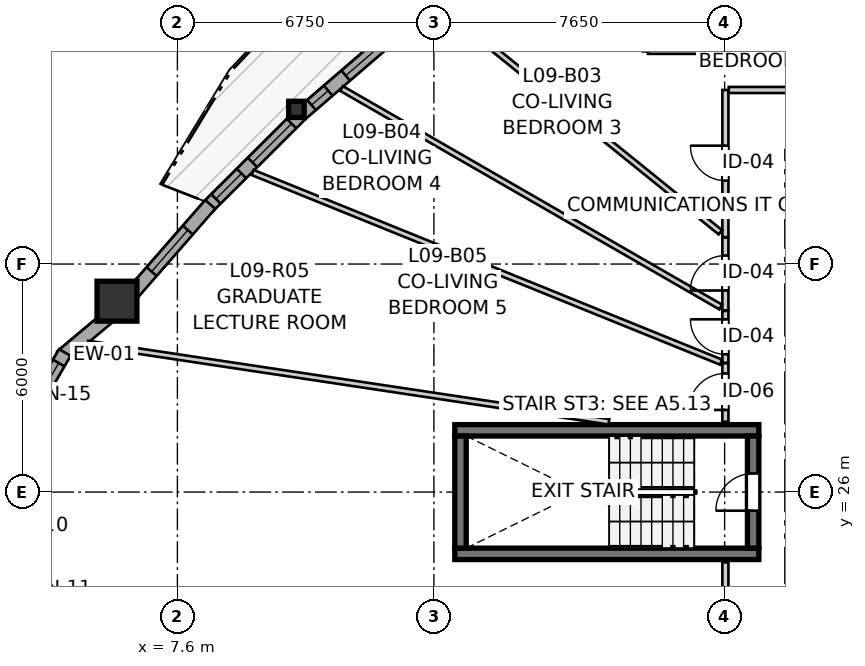
"""IFC4 building model, lengths in metres.
Left out: names, types, materials, properties, quantities, classifications, styles, units other than length and angle.
Written with IfcOpenShell. Run it as: python <this file> out.ifc"""

import sys

from ifc_helpers import new_model, si_unit, direction, frame, frame_2d, origin, origin_2d, place, context, subcontext, project, spatial, rectangle, i_section, extrude, source, transform, mapped, element, fill, save


model = new_model("IFC4")
c1 = context("Model", 3, precision=1e-05, world=origin(), true_north=direction((0.0, 1.0)))
c2 = subcontext(c1, "Body", "Model", "MODEL_VIEW")
j1 = project(units=[si_unit("LENGTHUNIT", "METRE"), si_unit("PLANEANGLEUNIT", "RADIAN")], contexts=[c1])
p1 = place(None, origin())
s1 = spatial("IfcSite", under=j1, at=p1, CompositionType="ELEMENT")
p2 = place(p1, origin())
s2 = spatial("IfcBuilding", under=s1, at=p2, CompositionType="ELEMENT")
p3 = place(p2, frame((0.0, 0.0, 33.4)))
s3 = spatial("IfcBuildingStorey", under=s2, at=p3, CompositionType="ELEMENT", Elevation=33.4)
for number, where, z_axis, x_axis in (
    (1, (14.9, 24.375, 0.0), (0.0, 0.0, 1.0), (1.0, 0.0, 0.0)),
    (2, (22.9, 27.625, 0.0), (0.0, 0.0, 1.0), (-1.0, 0.0, 0.0)),
):
    element("IfcWall", number, at=place(p3, frame(where, z_axis=z_axis, x_axis=x_axis)), inside=s3, PredefinedType="SHEAR", context=c2, shape_type="SweptSolid", body=[
        extrude(rectangle(XDim=8.0, YDim=0.3, at=frame_2d((4.0, 0.0))), origin(), (0.0, 0.0, 1.0), 2.94),
    ])
p4 = place(p3, frame((15.05, 27.475, 0.0), z_axis=(0.0, 0.0, 1.0), x_axis=(0.0, -1.0, 0.0)))
e3 = element("IfcWall", 3, at=p4, inside=s3, PredefinedType="SHEAR", context=c2, shape_type="SweptSolid", body=[
    extrude(rectangle(XDim=2.95, YDim=0.3, at=frame_2d((1.475, 0.0))), origin(), (0.0, 0.0, 1.0), 2.94),
])
p5 = place(p3, frame((22.75, 24.525, 0.0), z_axis=(0.0, 0.0, 1.0), x_axis=(0.0, 1.0, 0.0)))
e4 = element("IfcWall", 4, at=p5, inside=s3, PredefinedType="SHEAR", context=c2, shape_type="SweptSolid", body=[
    extrude(rectangle(XDim=2.95, YDim=0.3, at=frame_2d((1.475, 0.0))), origin(), (0.0, 0.0, 1.0), 2.94),
])
p6 = place(p5, frame((0.985, 0.0, 0.0)))
e5 = element("IfcOpeningElement", 5, at=p6, cuts=e4, PredefinedType="OPENING", context=c2, shape_type="SweptSolid", body=[
    extrude(rectangle(XDim=0.98, YDim=2.15, at=frame_2d((0.49, 1.075))), frame((0.0, 0.16, 0.0), z_axis=(0.0, -1.0, 0.0), x_axis=(1.0, 0.0, 0.0)), (0.0, 0.0, 1.0), 0.32),
])
m1 = source(origin(), c2, "Body", "SweptSolid", [
    extrude(rectangle(XDim=1.05, YDim=1.05, at=origin_2d()), origin(), (0.0, 0.0, 1.0), 2.94),
])
p7 = place(p3, frame((6.01, 31.023, 0.0), z_axis=(0.0, 0.0, 1.0), x_axis=(1.0, 0.0, 0.0)))
e6 = element("IfcColumn", 6, at=p7, inside=s3, PredefinedType="COLUMN", context=c2, shape_type="MappedRepresentation", body=[
    mapped(m1, transform((0.0, 0.0, 0.0), x_axis=(1.0, 0.0, 0.0), y_axis=(0.0, 1.0, 0.0), z_axis=(0.0, 0.0, 1.0), scale=1.0)),
])
m2 = source(origin(), c2, "Body", "SweptSolid", [
    extrude(i_section(OverallWidth=0.409, OverallDepth=0.425, WebThickness=0.03, FlangeThickness=0.048, FilletRadius=0.015, at=origin_2d()), origin(), (0.0, 0.0, 1.0), 2.94),
])
p8 = place(p3, frame((10.732, 36.07, 0.0), z_axis=(0.0, 0.0, 1.0), x_axis=(1.0, 0.0, 0.0)))
e7 = element("IfcColumn", 7, at=p8, inside=s3, PredefinedType="PILASTER", context=c2, shape_type="MappedRepresentation", body=[
    mapped(m2, transform((0.0, 0.0, 0.0), x_axis=(1.0, 0.0, 0.0), y_axis=(0.0, 1.0, 0.0), z_axis=(0.0, 0.0, 1.0), scale=1.0)),
])
p9 = place(p3, frame((5.893, 30.696, 0.0), z_axis=(0.0, 0.0, 1.0), x_axis=(-0.766001205563, -0.64283913468, 0.0)))
e8 = element("IfcWall", 8, at=p9, inside=s3, PredefinedType="SOLIDWALL", context=c2, shape_type="SweptSolid", body=[
    extrude(rectangle(XDim=1.752, YDim=0.35, at=frame_2d((0.876, 0.0))), origin(), (0.0, 0.0, 1.0), 2.42),
])
p10 = place(p3, frame((4.637, 29.674, 0.0), z_axis=(0.0, 0.0, 1.0), x_axis=(-0.499995423472, -0.866028046028, 0.0)))
e9 = element("IfcWall", 9, at=p10, inside=s3, PredefinedType="SOLIDWALL", context=c2, shape_type="SweptSolid", body=[
    extrude(rectangle(XDim=2.09, YDim=0.35, at=frame_2d((1.045, 0.0))), origin(), (0.0, 0.0, 1.0), 2.42),
])
p11 = place(p10, frame((0.32, 0.0, 0.82)))
e10 = element("IfcOpeningElement", 10, at=p11, cuts=e9, PredefinedType="OPENING", context=c2, shape_type="SweptSolid", body=[
    extrude(rectangle(XDim=1.45, YDim=1.25, at=frame_2d((0.725, 0.625))), frame((0.0, 0.185, 0.0), z_axis=(0.0, -1.0, 0.0), x_axis=(1.0, 0.0, 0.0)), (0.0, 0.0, 1.0), 0.37),
])
p12 = place(p3, frame((3.592, 24.137, 0.0), z_axis=(0.0, 0.0, 1.0), x_axis=(0.499995423472, -0.866028046028, 0.0)))
e11 = element("IfcWall", 11, at=p12, inside=s3, PredefinedType="SOLIDWALL", context=c2, shape_type="SweptSolid", body=[
    extrude(rectangle(XDim=2.09, YDim=0.35, at=frame_2d((1.045, 0.0))), origin(), (0.0, 0.0, 1.0), 2.42),
])
p13 = place(p12, frame((0.42, 0.0, 0.82)))
e12 = element("IfcOpeningElement", 12, at=p13, cuts=e11, PredefinedType="OPENING", context=c2, shape_type="SweptSolid", body=[
    extrude(rectangle(XDim=1.25, YDim=1.35, at=frame_2d((0.625, 0.675))), frame((0.0, 0.185, 0.0), z_axis=(0.0, -1.0, 0.0), x_axis=(1.0, 0.0, 0.0)), (0.0, 0.0, 1.0), 0.37),
])
p14 = place(p3, frame((13.424, 38.16, 0.0), z_axis=(0.0, 0.0, 1.0), x_axis=(-0.757512075852, -0.652821150805, 0.0)))
e13 = element("IfcWall", 13, at=p14, inside=s3, PredefinedType="SOLIDWALL", context=c2, shape_type="SweptSolid", body=[
    extrude(rectangle(XDim=3.384, YDim=0.35, at=frame_2d((1.692, 0.0))), origin(), (0.0, 0.0, 1.0), 2.42),
])
p15 = place(p14, frame((0.392, 0.0, 0.82)))
e14 = element("IfcOpeningElement", 14, at=p15, cuts=e13, PredefinedType="OPENING", context=c2, shape_type="SweptSolid", body=[
    extrude(rectangle(XDim=1.45, YDim=1.25, at=frame_2d((0.725, 0.625))), frame((0.0, 0.185, 0.0), z_axis=(0.0, -1.0, 0.0), x_axis=(1.0, 0.0, 0.0)), (0.0, 0.0, 1.0), 0.37),
])
p16 = place(p14, frame((2.449, 0.0, 0.82)))
e15 = element("IfcOpeningElement", 15, at=p16, cuts=e13, PredefinedType="OPENING", context=c2, shape_type="SweptSolid", body=[
    extrude(rectangle(XDim=0.58, YDim=1.35, at=frame_2d((0.29, 0.675))), frame((0.0, 0.185, 0.0), z_axis=(0.0, -1.0, 0.0), x_axis=(1.0, 0.0, 0.0)), (0.0, 0.0, 1.0), 0.37),
])
p17 = place(p3, frame((10.841, 35.932, 0.0), z_axis=(0.0, 0.0, 1.0), x_axis=(-0.708383272101, -0.70582798174, 0.0)))
e16 = element("IfcWall", 16, at=p17, inside=s3, PredefinedType="SOLIDWALL", context=c2, shape_type="SweptSolid", body=[
    extrude(rectangle(XDim=3.439, YDim=0.35, at=frame_2d((1.72, 0.0))), origin(), (0.0, 0.0, 1.0), 2.42),
])
p18 = place(p17, frame((0.334, 0.0, 0.82)))
e17 = element("IfcOpeningElement", 17, at=p18, cuts=e16, PredefinedType="OPENING", context=c2, shape_type="SweptSolid", body=[
    extrude(rectangle(XDim=1.45, YDim=1.25, at=frame_2d((0.725, 0.625))), frame((0.0, 0.185, 0.0), z_axis=(0.0, -1.0, 0.0), x_axis=(1.0, 0.0, 0.0)), (0.0, 0.0, 1.0), 0.37),
])
p19 = place(p17, frame((2.194, 0.0, 0.82)))
e18 = element("IfcOpeningElement", 18, at=p19, cuts=e16, PredefinedType="OPENING", context=c2, shape_type="SweptSolid", body=[
    extrude(rectangle(XDim=0.95, YDim=1.35, at=frame_2d((0.475, 0.675))), frame((0.0, 0.185, 0.0), z_axis=(0.0, -1.0, 0.0), x_axis=(1.0, 0.0, 0.0)), (0.0, 0.0, 1.0), 0.37),
])
p20 = place(p3, frame((8.465, 33.569, 0.0), z_axis=(0.0, 0.0, 1.0), x_axis=(-0.657600500685, -0.753366830634, 0.0)))
e19 = element("IfcWall", 19, at=p20, inside=s3, PredefinedType="SOLIDWALL", context=c2, shape_type="SweptSolid", body=[
    extrude(rectangle(XDim=3.233, YDim=0.35, at=frame_2d((1.616, 0.0))), origin(), (0.0, 0.0, 1.0), 2.42),
])
p21 = place(p20, frame((0.896, 0.0, 0.82)))
e20 = element("IfcOpeningElement", 20, at=p21, cuts=e19, PredefinedType="OPENING", context=c2, shape_type="SweptSolid", body=[
    extrude(rectangle(XDim=1.45, YDim=1.25, at=frame_2d((0.725, 0.625))), frame((0.0, 0.185, 0.0), z_axis=(0.0, -1.0, 0.0), x_axis=(1.0, 0.0, 0.0)), (0.0, 0.0, 1.0), 0.37),
])
p22 = place(p3, frame((22.02, 16.883, 0.0), z_axis=(0.0, 0.0, 1.0), x_axis=(0.0, 1.0, 0.0)))
e21 = element("IfcWall", 21, at=p22, inside=s3, PredefinedType="PARTITIONING", context=c2, shape_type="SweptSolid", body=[
    extrude(rectangle(XDim=7.267, YDim=0.16, at=frame_2d((3.633, 0.0))), origin(), (0.0, 0.0, 1.0), 2.94),
])
p23 = place(p22, frame((2.845, 0.0, 0.0)))
e22 = element("IfcOpeningElement", 22, at=p23, cuts=e21, PredefinedType="OPENING", context=c2, shape_type="SweptSolid", body=[
    extrude(rectangle(XDim=1.3, YDim=2.1, at=frame_2d((0.65, 1.05))), frame((0.0, 0.09, 0.0), z_axis=(0.0, -1.0, 0.0), x_axis=(1.0, 0.0, 0.0)), (0.0, 0.0, 1.0), 0.18),
])
p24 = place(p3, frame((22.02, 32.71, 0.0), z_axis=(0.0, 0.0, 1.0), x_axis=(0.0, 1.0, 0.0)))
e23 = element("IfcWall", 23, at=p24, inside=s3, PredefinedType="PARTITIONING", context=c2, shape_type="SweptSolid", body=[
    extrude(rectangle(XDim=3.87, YDim=0.16, at=frame_2d((1.935, 0.0))), origin(), (0.0, 0.0, 1.0), 2.94),
])
p25 = place(p24, frame((1.485, 0.0, 0.0)))
e24 = element("IfcOpeningElement", 24, at=p25, cuts=e23, PredefinedType="OPENING", context=c2, shape_type="SweptSolid", body=[
    extrude(rectangle(XDim=0.92, YDim=2.1, at=frame_2d((0.46, 1.05))), frame((0.0, 0.09, 0.0), z_axis=(0.0, -1.0, 0.0), x_axis=(1.0, 0.0, 0.0)), (0.0, 0.0, 1.0), 0.18),
])
p26 = place(p3, frame((22.02, 30.782, 0.0), z_axis=(0.0, 0.0, 1.0), x_axis=(0.0, 1.0, 0.0)))
e25 = element("IfcWall", 25, at=p26, inside=s3, PredefinedType="PARTITIONING", context=c2, shape_type="SweptSolid", body=[
    extrude(rectangle(XDim=1.913, YDim=0.16, at=frame_2d((0.957, 0.0))), origin(), (0.0, 0.0, 1.0), 2.94),
])
p27 = place(p26, frame((0.522, 0.0, 0.0)))
e26 = element("IfcOpeningElement", 26, at=p27, cuts=e25, PredefinedType="OPENING", context=c2, shape_type="SweptSolid", body=[
    extrude(rectangle(XDim=0.92, YDim=2.1, at=frame_2d((0.46, 1.05))), frame((0.0, 0.09, 0.0), z_axis=(0.0, -1.0, 0.0), x_axis=(1.0, 0.0, 0.0)), (0.0, 0.0, 1.0), 0.18),
])
p28 = place(p3, frame((22.02, 27.85, 0.0), z_axis=(0.0, 0.0, 1.0), x_axis=(0.0, 1.0, 0.0)))
e27 = element("IfcWall", 27, at=p28, inside=s3, PredefinedType="PARTITIONING", context=c2, shape_type="SweptSolid", body=[
    extrude(rectangle(XDim=1.539, YDim=0.16, at=frame_2d((0.77, 0.0))), origin(), (0.0, 0.0, 1.0), 2.94),
])
p29 = place(p28, frame((0.311, 0.0, 0.0)))
e28 = element("IfcOpeningElement", 28, at=p29, cuts=e27, PredefinedType="OPENING", context=c2, shape_type="SweptSolid", body=[
    extrude(rectangle(XDim=0.96, YDim=2.1, at=frame_2d((0.48, 1.05))), frame((0.0, 0.09, 0.0), z_axis=(0.0, -1.0, 0.0), x_axis=(1.0, 0.0, 0.0)), (0.0, 0.0, 1.0), 0.18),
])
p30 = place(p3, frame((22.02, 29.404, 0.0), z_axis=(0.0, 0.0, 1.0), x_axis=(0.0, 1.0, 0.0)))
e29 = element("IfcWall", 29, at=p30, inside=s3, PredefinedType="PARTITIONING", context=c2, shape_type="SweptSolid", body=[
    extrude(rectangle(XDim=1.363, YDim=0.16, at=frame_2d((0.682, 0.0))), origin(), (0.0, 0.0, 1.0), 2.94),
])
p31 = place(p30, frame((0.222, 0.0, 0.0)))
e30 = element("IfcOpeningElement", 30, at=p31, cuts=e29, PredefinedType="OPENING", context=c2, shape_type="SweptSolid", body=[
    extrude(rectangle(XDim=0.92, YDim=2.1, at=frame_2d((0.46, 1.05))), frame((0.0, 0.09, 0.0), z_axis=(0.0, -1.0, 0.0), x_axis=(1.0, 0.0, 0.0)), (0.0, 0.0, 1.0), 0.18),
])
p32 = place(p3, frame((5.242, 29.91, 0.0), z_axis=(0.0, 0.0, 1.0), x_axis=(0.988899381561, -0.148586719285, 0.0)))
e31 = element("IfcWall", 31, at=p32, inside=s3, PredefinedType="PARTITIONING", context=c2, shape_type="SweptSolid", body=[
    extrude(rectangle(XDim=13.864, YDim=0.145, at=frame_2d((6.932, 0.0))), origin(), (0.0, 0.0, 1.0), 2.94),
])
p33 = place(p3, frame((9.577, 34.41, 0.0), z_axis=(0.0, 0.0, 1.0), x_axis=(0.926920362809, -0.375258099194, 0.0)))
e32 = element("IfcWall", 32, at=p33, inside=s3, PredefinedType="PARTITIONING", context=c2, shape_type="SweptSolid", body=[
    extrude(rectangle(XDim=13.3, YDim=0.145, at=frame_2d((6.65, 0.0))), origin(), (0.0, 0.0, 1.0), 2.94),
])
p34 = place(p3, frame((11.92, 36.618, 0.0), z_axis=(0.0, 0.0, 1.0), x_axis=(0.866473494239, -0.499223080177, 0.0)))
e33 = element("IfcWall", 33, at=p34, inside=s3, PredefinedType="PARTITIONING", context=c2, shape_type="SweptSolid", body=[
    extrude(rectangle(XDim=11.514, YDim=0.145, at=frame_2d((5.757, 0.0))), origin(), (0.0, 0.0, 1.0), 2.94),
])
p35 = place(p3, frame((14.566, 38.751, 0.0), z_axis=(0.0, 0.0, 1.0), x_axis=(0.777881688073, -0.628410756879, 0.0)))
e34 = element("IfcWall", 34, at=p35, inside=s3, PredefinedType="PARTITIONING", context=c2, shape_type="SweptSolid", body=[
    extrude(rectangle(XDim=9.413, YDim=0.145, at=frame_2d((4.707, 0.0))), origin(), (0.0, 0.0, 1.0), 2.94),
])
p36 = place(p3, frame((20.481, 42.51, 0.0), z_axis=(0.0, 0.0, 1.0), x_axis=(0.513067331262, -0.858348363773, 0.0)))
e35 = element("IfcWall", 35, at=p36, inside=s3, PredefinedType="PARTITIONING", context=c2, shape_type="SweptSolid", body=[
    extrude(rectangle(XDim=6.765, YDim=0.145, at=frame_2d((3.382, 0.0))), origin(), (0.0, 0.0, 1.0), 2.94),
])
p37 = place(p3, frame((22.108, 36.58, 0.0), z_axis=(0.0, 0.0, 1.0), x_axis=(1.0, 0.0, 0.0)))
e36 = element("IfcWall", 36, at=p37, inside=s3, PredefinedType="PARTITIONING", context=c2, shape_type="SweptSolid", body=[
    extrude(rectangle(XDim=1.746, YDim=0.16, at=frame_2d((0.873, 0.0))), origin(), (0.0, 0.0, 1.0), 2.548),
])
p38 = place(p3, frame((19.983, 37.595, 0.0), z_axis=(0.0, 0.0, 1.0), x_axis=(1.0, 0.0, 0.0)))
e37 = element("IfcWall", 37, at=p38, inside=s3, PredefinedType="PARTITIONING", context=c2, shape_type="SweptSolid", body=[
    extrude(rectangle(XDim=1.654, YDim=0.13, at=frame_2d((0.827, 0.0))), origin(), (0.0, 0.0, 1.0), 2.94),
])
m3 = source(origin(), c2, "Body", "SweptSolid", [
    extrude(rectangle(XDim=1.45, YDim=1.25, at=frame_2d((0.725, 0.625))), frame((0.0, 0.03, 0.0), z_axis=(0.0, -1.0, 0.0), x_axis=(1.0, 0.0, 0.0)), (0.0, 0.0, 1.0), 0.06),
])
p39 = place(p11, origin())
e38 = element("IfcWindow", 38, at=p39, inside=s3, PartitioningType="SINGLE_PANEL", PredefinedType="WINDOW", context=c2, shape_type="MappedRepresentation", body=[
    mapped(m3, transform((0.0, 0.0, 0.0), x_axis=(1.0, 0.0, 0.0), y_axis=(0.0, 1.0, 0.0), z_axis=(0.0, 0.0, 1.0), scale=1.0)),
])
fill(e10, e38)
m4 = source(origin(), c2, "Body", "SweptSolid", [
    extrude(rectangle(XDim=1.25, YDim=1.35, at=frame_2d((0.625, 0.675))), frame((0.0, 0.03, 0.0), z_axis=(0.0, -1.0, 0.0), x_axis=(1.0, 0.0, 0.0)), (0.0, 0.0, 1.0), 0.06),
])
p40 = place(p13, origin())
e39 = element("IfcWindow", 39, at=p40, inside=s3, PartitioningType="SINGLE_PANEL", PredefinedType="WINDOW", context=c2, shape_type="MappedRepresentation", body=[
    mapped(m4, transform((0.0, 0.0, 0.0), x_axis=(1.0, 0.0, 0.0), y_axis=(0.0, 1.0, 0.0), z_axis=(0.0, 0.0, 1.0), scale=1.0)),
])
fill(e12, e39)
p41 = place(p15, origin())
e40 = element("IfcWindow", 40, at=p41, inside=s3, PartitioningType="SINGLE_PANEL", PredefinedType="WINDOW", context=c2, shape_type="MappedRepresentation", body=[
    mapped(m3, transform((0.0, 0.0, 0.0), x_axis=(1.0, 0.0, 0.0), y_axis=(0.0, 1.0, 0.0), z_axis=(0.0, 0.0, 1.0), scale=1.0)),
])
fill(e14, e40)
m5 = source(origin(), c2, "Body", "SweptSolid", [
    extrude(rectangle(XDim=0.58, YDim=1.35, at=frame_2d((0.29, 0.675))), frame((0.0, 0.03, 0.0), z_axis=(0.0, -1.0, 0.0), x_axis=(1.0, 0.0, 0.0)), (0.0, 0.0, 1.0), 0.06),
])
p42 = place(p16, origin())
e41 = element("IfcWindow", 41, at=p42, inside=s3, PartitioningType="SINGLE_PANEL", PredefinedType="WINDOW", context=c2, shape_type="MappedRepresentation", body=[
    mapped(m5, transform((0.0, 0.0, 0.0), x_axis=(1.0, 0.0, 0.0), y_axis=(0.0, 1.0, 0.0), z_axis=(0.0, 0.0, 1.0), scale=1.0)),
])
fill(e15, e41)
p43 = place(p18, origin())
e42 = element("IfcWindow", 42, at=p43, inside=s3, PartitioningType="SINGLE_PANEL", PredefinedType="WINDOW", context=c2, shape_type="MappedRepresentation", body=[
    mapped(m3, transform((0.0, 0.0, 0.0), x_axis=(1.0, 0.0, 0.0), y_axis=(0.0, 1.0, 0.0), z_axis=(0.0, 0.0, 1.0), scale=1.0)),
])
fill(e17, e42)
m6 = source(origin(), c2, "Body", "SweptSolid", [
    extrude(rectangle(XDim=0.95, YDim=1.35, at=frame_2d((0.475, 0.675))), frame((0.0, 0.03, 0.0), z_axis=(0.0, -1.0, 0.0), x_axis=(1.0, 0.0, 0.0)), (0.0, 0.0, 1.0), 0.06),
])
p44 = place(p19, origin())
e43 = element("IfcWindow", 43, at=p44, inside=s3, PartitioningType="SINGLE_PANEL", PredefinedType="WINDOW", context=c2, shape_type="MappedRepresentation", body=[
    mapped(m6, transform((0.0, 0.0, 0.0), x_axis=(1.0, 0.0, 0.0), y_axis=(0.0, 1.0, 0.0), z_axis=(0.0, 0.0, 1.0), scale=1.0)),
])
fill(e18, e43)
p45 = place(p21, origin())
e44 = element("IfcWindow", 44, at=p45, inside=s3, PartitioningType="SINGLE_PANEL", PredefinedType="WINDOW", context=c2, shape_type="MappedRepresentation", body=[
    mapped(m3, transform((0.0, 0.0, 0.0), x_axis=(1.0, 0.0, 0.0), y_axis=(0.0, 1.0, 0.0), z_axis=(0.0, 0.0, 1.0), scale=1.0)),
])
fill(e20, e44)
m7 = source(origin(), c2, "Body", "SweptSolid", [
    extrude(rectangle(XDim=0.98, YDim=2.15, at=frame_2d((0.49, 1.075))), frame((0.0, 0.025, 0.0), z_axis=(0.0, -1.0, 0.0), x_axis=(1.0, 0.0, 0.0)), (0.0, 0.0, 1.0), 0.05),
])
p46 = place(p6, origin())
e45 = element("IfcDoor", 45, at=p46, inside=s3, OperationType="SINGLE_SWING_LEFT", PredefinedType="DOOR", context=c2, shape_type="MappedRepresentation", body=[
    mapped(m7, transform((0.0, 0.0, 0.0), x_axis=(1.0, 0.0, 0.0), y_axis=(0.0, 1.0, 0.0), z_axis=(0.0, 0.0, 1.0), scale=1.0)),
])
fill(e5, e45)
m8 = source(origin(), c2, "Body", "SweptSolid", [
    extrude(rectangle(XDim=0.92, YDim=2.1, at=frame_2d((0.46, 1.05))), frame((0.0, 0.025, 0.0), z_axis=(0.0, -1.0, 0.0), x_axis=(1.0, 0.0, 0.0)), (0.0, 0.0, 1.0), 0.05),
])
p47 = place(p25, origin())
e46 = element("IfcDoor", 46, at=p47, inside=s3, OperationType="SINGLE_SWING_RIGHT", PredefinedType="DOOR", context=c2, shape_type="MappedRepresentation", body=[
    mapped(m8, transform((0.0, 0.0, 0.0), x_axis=(1.0, 0.0, 0.0), y_axis=(0.0, 1.0, 0.0), z_axis=(0.0, 0.0, 1.0), scale=1.0)),
])
fill(e24, e46)
p48 = place(p27, origin())
e47 = element("IfcDoor", 47, at=p48, inside=s3, OperationType="SINGLE_SWING_LEFT", PredefinedType="DOOR", context=c2, shape_type="MappedRepresentation", body=[
    mapped(m8, transform((0.0, 0.0, 0.0), x_axis=(1.0, 0.0, 0.0), y_axis=(0.0, 1.0, 0.0), z_axis=(0.0, 0.0, 1.0), scale=1.0)),
])
fill(e26, e47)
m9 = source(origin(), c2, "Body", "SweptSolid", [
    extrude(rectangle(XDim=0.96, YDim=2.1, at=frame_2d((0.48, 1.05))), frame((0.0, 0.025, 0.0), z_axis=(0.0, -1.0, 0.0), x_axis=(1.0, 0.0, 0.0)), (0.0, 0.0, 1.0), 0.05),
])
p49 = place(p29, origin())
e48 = element("IfcDoor", 48, at=p49, inside=s3, OperationType="SINGLE_SWING_LEFT", PredefinedType="DOOR", context=c2, shape_type="MappedRepresentation", body=[
    mapped(m9, transform((0.0, 0.0, 0.0), x_axis=(1.0, 0.0, 0.0), y_axis=(0.0, 1.0, 0.0), z_axis=(0.0, 0.0, 1.0), scale=1.0)),
])
fill(e28, e48)
p50 = place(p31, origin())
e49 = element("IfcDoor", 49, at=p50, inside=s3, OperationType="SINGLE_SWING_RIGHT", PredefinedType="DOOR", context=c2, shape_type="MappedRepresentation", body=[
    mapped(m8, transform((0.0, 0.0, 0.0), x_axis=(1.0, 0.0, 0.0), y_axis=(0.0, 1.0, 0.0), z_axis=(0.0, 0.0, 1.0), scale=1.0)),
])
fill(e30, e49)
save(model, sys.argv[1])
